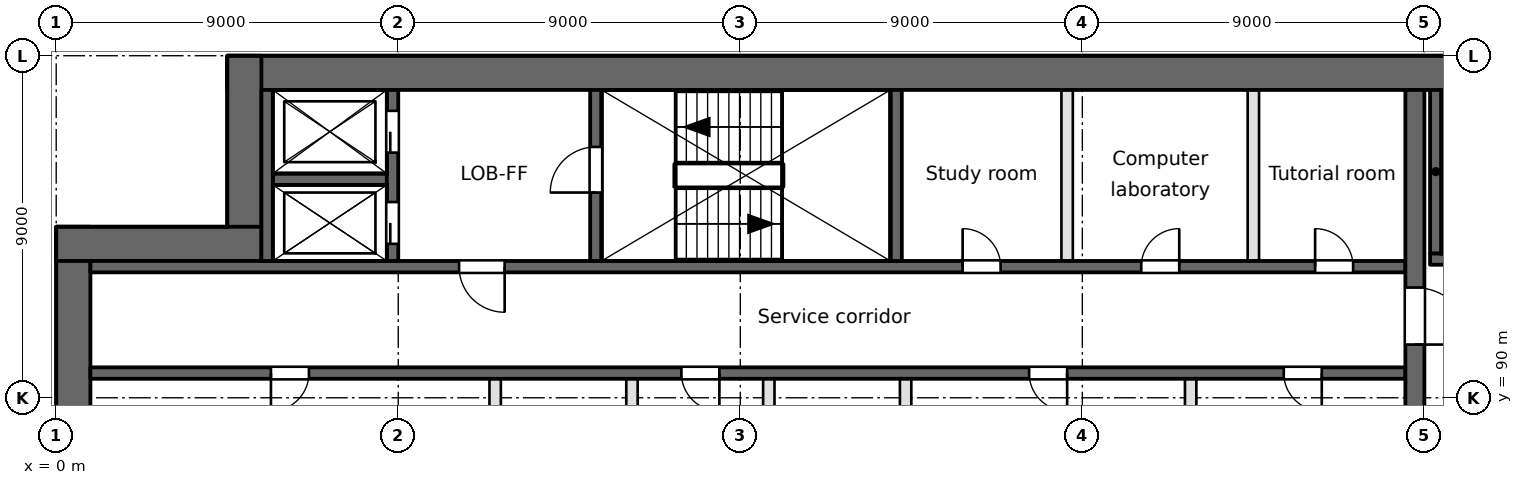
"""IFC4 building model, lengths in metres.
Left out: names, types, materials, properties, quantities, classifications, styles, units other than length and angle.
Written with IfcOpenShell. Run it as: python <this file> out.ifc"""

import sys

from ifc_helpers import new_model, si_unit, direction, frame, frame_2d, origin, place, context, subcontext, project, spatial, rectangle, extrude, element, fill, save


model = new_model("IFC4")
c1 = context("Model", 3, precision=1e-05, world=origin(), true_north=direction((0.0, 1.0)))
c2 = subcontext(c1, "Body", "Model", "MODEL_VIEW")
j1 = project(units=[si_unit("LENGTHUNIT", "METRE"), si_unit("PLANEANGLEUNIT", "RADIAN")], contexts=[c1])
p1 = place(None, origin())
s1 = spatial("IfcSite", under=j1, at=p1, CompositionType="ELEMENT")
p2 = place(p1, origin())
s2 = spatial("IfcBuilding", under=s1, at=p2, CompositionType="ELEMENT")
p3 = place(p2, frame((0.0, 0.0, 46.9)))
s3 = spatial("IfcBuildingStorey", under=s2, at=p3, CompositionType="ELEMENT", Elevation=46.9)
p4 = place(p3, frame((0.45, 94.5, 0.0), z_axis=(0.0, 0.0, 1.0), x_axis=(0.0, -1.0, 0.0)))
e1 = element("IfcWall", 1, at=p4, inside=s3, PredefinedType="SHEAR", context=c2, shape_type="SweptSolid", body=[
    extrude(rectangle(XDim=66.187, YDim=0.9, at=frame_2d((33.094, 0.0))), origin(), (0.0, 0.0, 1.0), 3.7),
])
p5 = place(p3, frame((94.5, 98.55, 0.0), z_axis=(0.0, 0.0, 1.0), x_axis=(-1.0, 0.0, 0.0)))
e2 = element("IfcWall", 2, at=p5, inside=s3, PredefinedType="SHEAR", context=c2, shape_type="SweptSolid", body=[
    extrude(rectangle(XDim=90.0, YDim=0.9, at=frame_2d((45.0, 0.0))), origin(), (0.0, 0.0, 1.0), 3.7),
])
for number, where, z_axis, x_axis in (
    (3, (4.95, 99.0, 0.0), (0.0, 0.0, 1.0), (0.0, -1.0, 0.0)),
    (4, (5.4, 94.05, 0.0), (0.0, 0.0, 1.0), (-1.0, 0.0, 0.0)),
):
    element("IfcWall", number, at=place(p3, frame(where, z_axis=z_axis, x_axis=x_axis)), inside=s3, PredefinedType="SHEAR", context=c2, shape_type="SweptSolid", body=[
        extrude(rectangle(XDim=5.4, YDim=0.9, at=frame_2d((2.7, 0.0))), origin(), (0.0, 0.0, 1.0), 3.7),
    ])
p6 = place(p3, frame((0.9, 90.65, -0.4), z_axis=(0.0, 0.0, 1.0), x_axis=(1.0, 0.0, 0.0)))
e5 = element("IfcWall", 5, at=p6, inside=s3, PredefinedType="SOLIDWALL", context=c2, shape_type="SweptSolid", body=[
    extrude(rectangle(XDim=34.6, YDim=0.3, at=frame_2d((17.3, 0.0))), origin(), (0.0, 0.0, 1.0), 3.7),
])
p7 = place(p6, frame((4.75, 0.0, 0.4)))
e6 = element("IfcOpeningElement", 6, at=p7, cuts=e5, PredefinedType="OPENING", context=c2, shape_type="SweptSolid", body=[
    extrude(rectangle(XDim=1.0, YDim=2.1, at=frame_2d((0.5, 1.05))), frame((0.0, 0.15, 0.0), z_axis=(0.0, -1.0, 0.0), x_axis=(1.0, 0.0, 0.0)), (0.0, 0.0, 1.0), 0.3),
])
p8 = place(p6, frame((24.7, 0.0, 0.4)))
e7 = element("IfcOpeningElement", 7, at=p8, cuts=e5, PredefinedType="OPENING", context=c2, shape_type="SweptSolid", body=[
    extrude(rectangle(XDim=1.0, YDim=2.1, at=frame_2d((0.5, 1.05))), frame((0.0, 0.15, 0.0), z_axis=(0.0, -1.0, 0.0), x_axis=(1.0, 0.0, 0.0)), (0.0, 0.0, 1.0), 0.3),
])
p9 = place(p6, frame((15.55, 0.0, 0.4)))
e8 = element("IfcOpeningElement", 8, at=p9, cuts=e5, PredefinedType="OPENING", context=c2, shape_type="SweptSolid", body=[
    extrude(rectangle(XDim=1.0, YDim=2.1, at=frame_2d((0.5, 1.05))), frame((0.0, 0.15, 0.0), z_axis=(0.0, -1.0, 0.0), x_axis=(1.0, 0.0, 0.0)), (0.0, 0.0, 1.0), 0.3),
])
p10 = place(p6, frame((31.4, 0.0, 0.4)))
e9 = element("IfcOpeningElement", 9, at=p10, cuts=e5, PredefinedType="OPENING", context=c2, shape_type="SweptSolid", body=[
    extrude(rectangle(XDim=1.0, YDim=2.1, at=frame_2d((0.5, 1.05))), frame((0.0, 0.15, 0.0), z_axis=(0.0, -1.0, 0.0), x_axis=(1.0, 0.0, 0.0)), (0.0, 0.0, 1.0), 0.3),
])
p11 = place(p3, frame((0.9, 93.45, -0.4), z_axis=(0.0, 0.0, 1.0), x_axis=(1.0, 0.0, 0.0)))
e10 = element("IfcWall", 10, at=p11, inside=s3, PredefinedType="SOLIDWALL", context=c2, shape_type="SweptSolid", body=[
    extrude(rectangle(XDim=34.6, YDim=0.3, at=frame_2d((17.3, 0.0))), origin(), (0.0, 0.0, 1.0), 3.7),
])
p12 = place(p11, frame((9.7, 0.0, 0.4)))
e11 = element("IfcOpeningElement", 11, at=p12, cuts=e10, PredefinedType="OPENING", context=c2, shape_type="SweptSolid", body=[
    extrude(rectangle(XDim=1.2, YDim=2.1, at=frame_2d((0.6, 1.05))), frame((0.0, 0.15, 0.0), z_axis=(0.0, -1.0, 0.0), x_axis=(1.0, 0.0, 0.0)), (0.0, 0.0, 1.0), 0.3),
])
p13 = place(p11, frame((22.95, 0.0, 0.4)))
e12 = element("IfcOpeningElement", 12, at=p13, cuts=e10, PredefinedType="OPENING", context=c2, shape_type="SweptSolid", body=[
    extrude(rectangle(XDim=1.0, YDim=2.1, at=frame_2d((0.5, 1.05))), frame((0.0, 0.15, 0.0), z_axis=(0.0, -1.0, 0.0), x_axis=(1.0, 0.0, 0.0)), (0.0, 0.0, 1.0), 0.3),
])
p14 = place(p11, frame((27.65, 0.0, 0.4)))
e13 = element("IfcOpeningElement", 13, at=p14, cuts=e10, PredefinedType="OPENING", context=c2, shape_type="SweptSolid", body=[
    extrude(rectangle(XDim=1.0, YDim=2.1, at=frame_2d((0.5, 1.05))), frame((0.0, 0.15, 0.0), z_axis=(0.0, -1.0, 0.0), x_axis=(1.0, 0.0, 0.0)), (0.0, 0.0, 1.0), 0.3),
])
p15 = place(p11, frame((32.225, 0.0, 0.4)))
e14 = element("IfcOpeningElement", 14, at=p15, cuts=e10, PredefinedType="OPENING", context=c2, shape_type="SweptSolid", body=[
    extrude(rectangle(XDim=1.0, YDim=2.1, at=frame_2d((0.5, 1.05))), frame((0.0, 0.15, 0.0), z_axis=(0.0, -1.0, 0.0), x_axis=(1.0, 0.0, 0.0)), (0.0, 0.0, 1.0), 0.3),
])
p16 = place(p3, frame((36.15, 93.65, -0.4), z_axis=(0.0, 0.0, 1.0), x_axis=(1.0, 0.0, 0.0)))
e15 = element("IfcWall", 15, at=p16, inside=s3, PredefinedType="SOLIDWALL", context=c2, shape_type="SweptSolid", body=[
    extrude(rectangle(XDim=8.2, YDim=0.3, at=frame_2d((4.1, 0.0))), origin(), (0.0, 0.0, 1.0), 3.7),
])
p17 = place(p16, frame((0.7, 0.0, 0.4)))
e16 = element("IfcOpeningElement", 16, at=p17, cuts=e15, PredefinedType="OPENING", context=c2, shape_type="SweptSolid", body=[
    extrude(rectangle(XDim=1.2, YDim=2.1, at=frame_2d((0.6, 1.05))), frame((0.0, 0.15, 0.0), z_axis=(0.0, -1.0, 0.0), x_axis=(1.0, 0.0, 0.0)), (0.0, 0.0, 1.0), 0.3),
])
p18 = place(p3, frame((5.7, 95.75, -0.4), z_axis=(0.0, 0.0, 1.0), x_axis=(1.0, 0.0, 0.0)))
e17 = element("IfcWall", 17, at=p18, inside=s3, PredefinedType="SOLIDWALL", context=c2, shape_type="SweptSolid", body=[
    extrude(rectangle(XDim=3.0, YDim=0.3, at=frame_2d((1.5, 0.0))), origin(), (0.0, 0.0, 1.0), 3.7),
])
p19 = place(p3, frame((5.55, 93.6, -0.4), z_axis=(0.0, 0.0, 1.0), x_axis=(0.0, 1.0, 0.0)))
e18 = element("IfcWall", 18, at=p19, inside=s3, PredefinedType="SOLIDWALL", context=c2, shape_type="SweptSolid", body=[
    extrude(rectangle(XDim=4.5, YDim=0.3, at=frame_2d((2.25, 0.0))), origin(), (0.0, 0.0, 1.0), 3.7),
])
p20 = place(p3, frame((8.85, 93.6, -0.4), z_axis=(0.0, 0.0, 1.0), x_axis=(0.0, 1.0, 0.0)))
e19 = element("IfcWall", 19, at=p20, inside=s3, PredefinedType="SOLIDWALL", context=c2, shape_type="SweptSolid", body=[
    extrude(rectangle(XDim=4.5, YDim=0.3, at=frame_2d((2.25, 0.0))), origin(), (0.0, 0.0, 1.0), 3.7),
])
p21 = place(p20, frame((0.45, 0.0, 0.4)))
e20 = element("IfcOpeningElement", 20, at=p21, cuts=e19, PredefinedType="OPENING", context=c2, shape_type="SweptSolid", body=[
    extrude(rectangle(XDim=1.1, YDim=2.1, at=frame_2d((0.55, 1.05))), frame((0.0, 0.15, 0.0), z_axis=(0.0, -1.0, 0.0), x_axis=(1.0, 0.0, 0.0)), (0.0, 0.0, 1.0), 0.3),
])
p22 = place(p20, frame((2.85, 0.0, 0.4)))
e21 = element("IfcOpeningElement", 21, at=p22, cuts=e19, PredefinedType="OPENING", context=c2, shape_type="SweptSolid", body=[
    extrude(rectangle(XDim=1.1, YDim=2.1, at=frame_2d((0.55, 1.05))), frame((0.0, 0.15, 0.0), z_axis=(0.0, -1.0, 0.0), x_axis=(1.0, 0.0, 0.0)), (0.0, 0.0, 1.0), 0.3),
])
p23 = place(p3, frame((11.55, 87.95, 0.0), z_axis=(0.0, 0.0, 1.0), x_axis=(0.0, 1.0, 0.0)))
e22 = element("IfcWall", 22, at=p23, inside=s3, PredefinedType="PARTITIONING", context=c2, shape_type="SweptSolid", body=[
    extrude(rectangle(XDim=2.55, YDim=0.3, at=frame_2d((1.275, 0.0))), origin(), (0.0, 0.0, 1.0), 3.3),
])
p24 = place(p3, frame((14.2, 93.6, -0.4), z_axis=(0.0, 0.0, 1.0), x_axis=(0.0, 1.0, 0.0)))
e23 = element("IfcWall", 23, at=p24, inside=s3, PredefinedType="SOLIDWALL", context=c2, shape_type="SweptSolid", body=[
    extrude(rectangle(XDim=4.5, YDim=0.3, at=frame_2d((2.25, 0.0))), origin(), (0.0, 0.0, 1.0), 3.7),
])
p25 = place(p24, frame((1.8, 0.0, 0.4)))
e24 = element("IfcOpeningElement", 24, at=p25, cuts=e23, PredefinedType="OPENING", context=c2, shape_type="SweptSolid", body=[
    extrude(rectangle(XDim=1.2, YDim=2.1, at=frame_2d((0.6, 1.05))), frame((0.0, 0.15, 0.0), z_axis=(0.0, -1.0, 0.0), x_axis=(1.0, 0.0, 0.0)), (0.0, 0.0, 1.0), 0.3),
])
for number, where, z_axis, x_axis in (
    (25, (15.15, 77.55, 0.0), (0.0, 0.0, 1.0), (0.0, 1.0, 0.0)),
    (26, (18.75, 77.55, 0.0), (0.0, 0.0, 1.0), (0.0, 1.0, 0.0)),
):
    element("IfcWall", number, at=place(p3, frame(where, z_axis=z_axis, x_axis=x_axis)), inside=s3, PredefinedType="PARTITIONING", context=c2, shape_type="SweptSolid", body=[
        extrude(rectangle(XDim=12.95, YDim=0.3, at=frame_2d((6.475, 0.0))), origin(), (0.0, 0.0, 1.0), 3.3),
    ])
p26 = place(p3, frame((22.1, 93.6, -0.4), z_axis=(0.0, 0.0, 1.0), x_axis=(0.0, 1.0, 0.0)))
e27 = element("IfcWall", 27, at=p26, inside=s3, PredefinedType="SOLIDWALL", context=c2, shape_type="SweptSolid", body=[
    extrude(rectangle(XDim=4.5, YDim=0.3, at=frame_2d((2.25, 0.0))), origin(), (0.0, 0.0, 1.0), 3.7),
])
p27 = place(p3, frame((22.35, 87.95, 0.0), z_axis=(0.0, 0.0, 1.0), x_axis=(0.0, 1.0, 0.0)))
e28 = element("IfcWall", 28, at=p27, inside=s3, PredefinedType="PARTITIONING", context=c2, shape_type="SweptSolid", body=[
    extrude(rectangle(XDim=2.55, YDim=0.3, at=frame_2d((1.275, 0.0))), origin(), (0.0, 0.0, 1.0), 3.3),
])
p28 = place(p3, frame((26.6, 93.6, 0.0), z_axis=(0.0, 0.0, 1.0), x_axis=(0.0, 1.0, 0.0)))
e29 = element("IfcWall", 29, at=p28, inside=s3, PredefinedType="PARTITIONING", context=c2, shape_type="SweptSolid", body=[
    extrude(rectangle(XDim=4.5, YDim=0.3, at=frame_2d((2.25, 0.0))), origin(), (0.0, 0.0, 1.0), 3.3),
])
p29 = place(p3, frame((29.85, 87.95, 0.0), z_axis=(0.0, 0.0, 1.0), x_axis=(0.0, 1.0, 0.0)))
e30 = element("IfcWall", 30, at=p29, inside=s3, PredefinedType="PARTITIONING", context=c2, shape_type="SweptSolid", body=[
    extrude(rectangle(XDim=2.55, YDim=0.3, at=frame_2d((1.275, 0.0))), origin(), (0.0, 0.0, 1.0), 3.3),
])
p30 = place(p3, frame((31.5, 93.6, 0.0), z_axis=(0.0, 0.0, 1.0), x_axis=(0.0, 1.0, 0.0)))
e31 = element("IfcWall", 31, at=p30, inside=s3, PredefinedType="PARTITIONING", context=c2, shape_type="SweptSolid", body=[
    extrude(rectangle(XDim=4.5, YDim=0.3, at=frame_2d((2.25, 0.0))), origin(), (0.0, 0.0, 1.0), 3.3),
])
p31 = place(p3, frame((35.75, 63.5, -0.4), z_axis=(0.0, 0.0, 1.0), x_axis=(0.0, 1.0, 0.0)))
e32 = element("IfcWall", 32, at=p31, inside=s3, PredefinedType="SOLIDWALL", context=c2, shape_type="SweptSolid", body=[
    extrude(rectangle(XDim=34.6, YDim=0.5, at=frame_2d((17.3, 0.0))), origin(), (0.0, 0.0, 1.0), 3.7),
])
p32 = place(p31, frame((9.7, 0.0, 0.4)))
e33 = element("IfcOpeningElement", 33, at=p32, cuts=e32, PredefinedType="OPENING", context=c2, shape_type="SweptSolid", body=[
    extrude(rectangle(XDim=2.4, YDim=2.1, at=frame_2d((1.2, 1.05))), frame((0.0, 0.25, 0.0), z_axis=(0.0, -1.0, 0.0), x_axis=(1.0, 0.0, 0.0)), (0.0, 0.0, 1.0), 0.5),
])
p33 = place(p31, frame((27.9, 0.0, 0.4)))
e34 = element("IfcOpeningElement", 34, at=p33, cuts=e32, PredefinedType="OPENING", context=c2, shape_type="SweptSolid", body=[
    extrude(rectangle(XDim=1.5, YDim=2.1, at=frame_2d((0.75, 1.05))), frame((0.0, 0.25, 0.0), z_axis=(0.0, -1.0, 0.0), x_axis=(1.0, 0.0, 0.0)), (0.0, 0.0, 1.0), 0.5),
])
p34 = place(p31, frame((1.5, 0.0, 0.4)))
e35 = element("IfcOpeningElement", 35, at=p34, cuts=e32, PredefinedType="OPENING", context=c2, shape_type="SweptSolid", body=[
    extrude(rectangle(XDim=1.2, YDim=2.1, at=frame_2d((0.6, 1.05))), frame((0.0, 0.25, 0.0), z_axis=(0.0, -1.0, 0.0), x_axis=(1.0, 0.0, 0.0)), (0.0, 0.0, 1.0), 0.5),
])
p35 = place(p3, frame((36.3, 93.8, -0.4), z_axis=(0.0, 0.0, 1.0), x_axis=(0.0, 1.0, 0.0)))
e36 = element("IfcWall", 36, at=p35, inside=s3, PredefinedType="SOLIDWALL", context=c2, shape_type="SweptSolid", body=[
    extrude(rectangle(XDim=4.3, YDim=0.3, at=frame_2d((2.15, 0.0))), origin(), (0.0, 0.0, 1.0), 3.7),
])
p36 = place(p21, origin())
e37 = element("IfcDoor", 37, at=p36, inside=s3, OperationType="SLIDING_TO_RIGHT", PredefinedType="DOOR", context=c2, shape_type="SweptSolid", body=[
    extrude(rectangle(XDim=1.1, YDim=2.1, at=frame_2d((0.55, 1.05))), frame((0.0, 0.025, 0.0), z_axis=(0.0, -1.0, 0.0), x_axis=(1.0, 0.0, 0.0)), (0.0, 0.0, 1.0), 0.05),
])
fill(e20, e37)
p37 = place(p22, origin())
e38 = element("IfcDoor", 38, at=p37, inside=s3, OperationType="SLIDING_TO_LEFT", PredefinedType="DOOR", context=c2, shape_type="SweptSolid", body=[
    extrude(rectangle(XDim=1.1, YDim=2.1, at=frame_2d((0.55, 1.05))), frame((0.0, 0.025, 0.0), z_axis=(0.0, -1.0, 0.0), x_axis=(1.0, 0.0, 0.0)), (0.0, 0.0, 1.0), 0.05),
])
fill(e21, e38)
p38 = place(p12, frame((1.2, 0.0, 0.0), z_axis=(0.0, 0.0, 1.0), x_axis=(-1.0, 0.0, 0.0)))
e39 = element("IfcDoor", 39, at=p38, inside=s3, OperationType="SINGLE_SWING_LEFT", PredefinedType="DOOR", context=c2, shape_type="SweptSolid", body=[
    extrude(rectangle(XDim=1.2, YDim=2.1, at=frame_2d((0.6, 1.05))), frame((0.0, 0.025, 0.0), z_axis=(0.0, -1.0, 0.0), x_axis=(1.0, 0.0, 0.0)), (0.0, 0.0, 1.0), 0.05),
])
fill(e11, e39)
p39 = place(p33, frame((1.5, 0.0, 0.0), z_axis=(0.0, 0.0, 1.0), x_axis=(-1.0, 0.0, 0.0)))
e40 = element("IfcDoor", 40, at=p39, inside=s3, OperationType="SINGLE_SWING_RIGHT", PredefinedType="DOOR", context=c2, shape_type="SweptSolid", body=[
    extrude(rectangle(XDim=1.5, YDim=2.1, at=frame_2d((0.75, 1.05))), frame((0.0, 0.025, 0.0), z_axis=(0.0, -1.0, 0.0), x_axis=(1.0, 0.0, 0.0)), (0.0, 0.0, 1.0), 0.05),
])
fill(e34, e40)
p40 = place(p25, origin())
e41 = element("IfcDoor", 41, at=p40, inside=s3, OperationType="SINGLE_SWING_LEFT", PredefinedType="DOOR", context=c2, shape_type="SweptSolid", body=[
    extrude(rectangle(XDim=1.2, YDim=2.1, at=frame_2d((0.6, 1.05))), frame((0.0, 0.025, 0.0), z_axis=(0.0, -1.0, 0.0), x_axis=(1.0, 0.0, 0.0)), (0.0, 0.0, 1.0), 0.05),
])
fill(e24, e41)
p41 = place(p7, frame((1.0, 0.0, 0.0), z_axis=(0.0, 0.0, 1.0), x_axis=(-1.0, 0.0, 0.0)))
e42 = element("IfcDoor", 42, at=p41, inside=s3, OperationType="SINGLE_SWING_RIGHT", PredefinedType="DOOR", context=c2, shape_type="SweptSolid", body=[
    extrude(rectangle(XDim=1.0, YDim=2.1, at=frame_2d((0.5, 1.05))), frame((0.0, 0.025, 0.0), z_axis=(0.0, -1.0, 0.0), x_axis=(1.0, 0.0, 0.0)), (0.0, 0.0, 1.0), 0.05),
])
fill(e6, e42)
p42 = place(p8, frame((1.0, 0.0, 0.0), z_axis=(0.0, 0.0, 1.0), x_axis=(-1.0, 0.0, 0.0)))
e43 = element("IfcDoor", 43, at=p42, inside=s3, OperationType="SINGLE_SWING_LEFT", PredefinedType="DOOR", context=c2, shape_type="SweptSolid", body=[
    extrude(rectangle(XDim=1.0, YDim=2.1, at=frame_2d((0.5, 1.05))), frame((0.0, 0.025, 0.0), z_axis=(0.0, -1.0, 0.0), x_axis=(1.0, 0.0, 0.0)), (0.0, 0.0, 1.0), 0.05),
])
fill(e7, e43)
p43 = place(p9, frame((1.0, 0.0, 0.0), z_axis=(0.0, 0.0, 1.0), x_axis=(-1.0, 0.0, 0.0)))
e44 = element("IfcDoor", 44, at=p43, inside=s3, OperationType="SINGLE_SWING_LEFT", PredefinedType="DOOR", context=c2, shape_type="SweptSolid", body=[
    extrude(rectangle(XDim=1.0, YDim=2.1, at=frame_2d((0.5, 1.05))), frame((0.0, 0.025, 0.0), z_axis=(0.0, -1.0, 0.0), x_axis=(1.0, 0.0, 0.0)), (0.0, 0.0, 1.0), 0.05),
])
fill(e8, e44)
p44 = place(p10, frame((1.0, 0.0, 0.0), z_axis=(0.0, 0.0, 1.0), x_axis=(-1.0, 0.0, 0.0)))
e45 = element("IfcDoor", 45, at=p44, inside=s3, OperationType="SINGLE_SWING_LEFT", PredefinedType="DOOR", context=c2, shape_type="SweptSolid", body=[
    extrude(rectangle(XDim=1.0, YDim=2.1, at=frame_2d((0.5, 1.05))), frame((0.0, 0.025, 0.0), z_axis=(0.0, -1.0, 0.0), x_axis=(1.0, 0.0, 0.0)), (0.0, 0.0, 1.0), 0.05),
])
fill(e9, e45)
p45 = place(p13, origin())
e46 = element("IfcDoor", 46, at=p45, inside=s3, OperationType="SINGLE_SWING_LEFT", PredefinedType="DOOR", context=c2, shape_type="SweptSolid", body=[
    extrude(rectangle(XDim=1.0, YDim=2.1, at=frame_2d((0.5, 1.05))), frame((0.0, 0.025, 0.0), z_axis=(0.0, -1.0, 0.0), x_axis=(1.0, 0.0, 0.0)), (0.0, 0.0, 1.0), 0.05),
])
fill(e12, e46)
p46 = place(p14, origin())
e47 = element("IfcDoor", 47, at=p46, inside=s3, OperationType="SINGLE_SWING_RIGHT", PredefinedType="DOOR", context=c2, shape_type="SweptSolid", body=[
    extrude(rectangle(XDim=1.0, YDim=2.1, at=frame_2d((0.5, 1.05))), frame((0.0, 0.025, 0.0), z_axis=(0.0, -1.0, 0.0), x_axis=(1.0, 0.0, 0.0)), (0.0, 0.0, 1.0), 0.05),
])
fill(e13, e47)
p47 = place(p15, origin())
e48 = element("IfcDoor", 48, at=p47, inside=s3, OperationType="SINGLE_SWING_LEFT", PredefinedType="DOOR", context=c2, shape_type="SweptSolid", body=[
    extrude(rectangle(XDim=1.0, YDim=2.1, at=frame_2d((0.5, 1.05))), frame((0.0, 0.025, 0.0), z_axis=(0.0, -1.0, 0.0), x_axis=(1.0, 0.0, 0.0)), (0.0, 0.0, 1.0), 0.05),
])
fill(e14, e48)
save(model, sys.argv[1])
